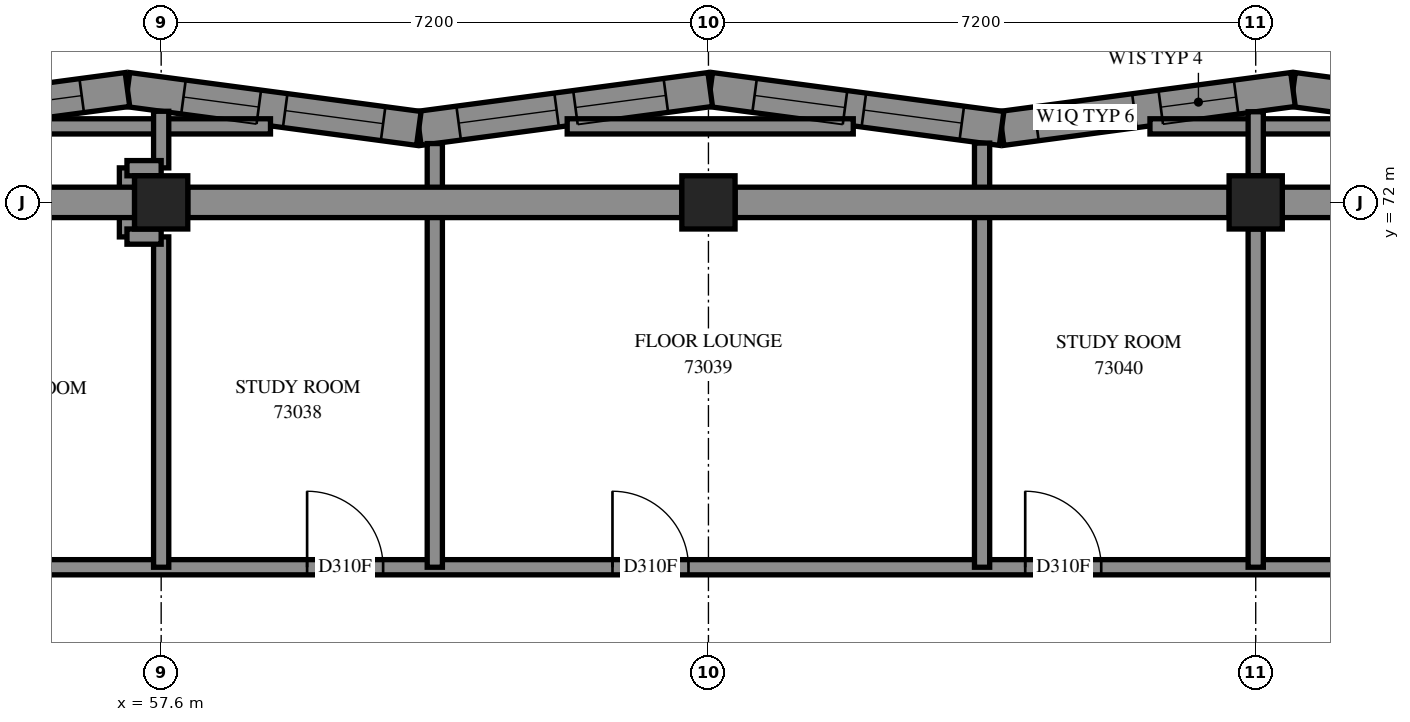
"""IFC4 building model, lengths in metres.
Left out: names, types, materials, properties, quantities, classifications, styles, units other than length and angle.
Written with IfcOpenShell. Run it as: python <this file> out.ifc"""

import sys

from ifc_helpers import new_model, si_unit, direction, frame, frame_2d, origin, origin_2d, place, context, subcontext, project, spatial, polyline, rectangle, outline, extrude, element, fill, save


model = new_model("IFC4")
c1 = context("Model", 3, precision=1e-05, world=origin(), true_north=direction((0.0, 1.0)))
c2 = subcontext(c1, "Body", "Model", "MODEL_VIEW")
j1 = project(units=[si_unit("LENGTHUNIT", "METRE"), si_unit("PLANEANGLEUNIT", "RADIAN")], contexts=[c1])
p1 = place(None, origin())
s1 = spatial("IfcSite", under=j1, at=p1, CompositionType="ELEMENT")
p2 = place(p1, origin())
s2 = spatial("IfcBuilding", under=s1, at=p2, CompositionType="ELEMENT")
p3 = place(p2, frame((0.0, 0.0, 267.6)))
s3 = spatial("IfcBuildingStorey", under=s2, at=p3, CompositionType="ELEMENT", Elevation=267.6)
for number, where, z_axis, x_axis in (
    (1, (57.6, 72.0, 0.0), (0.0, 0.0, 1.0), (1.0, 0.0, 0.0)),
    (2, (64.8, 72.0, 0.0), (0.0, 0.0, 1.0), (1.0, 0.0, 0.0)),
    (3, (72.0, 72.0, 0.0), (0.0, 0.0, 1.0), (1.0, 0.0, 0.0)),
):
    element("IfcColumn", number, at=place(p3, frame(where, z_axis=z_axis, x_axis=x_axis)), inside=s3, PredefinedType="COLUMN", context=c2, shape_type="SweptSolid", body=[
        extrude(rectangle(XDim=0.7, YDim=0.7, at=origin_2d()), origin(), (0.0, 0.0, 1.0), 3.1),
    ])
p4 = place(p3, frame((76.341, 72.971, 0.0), z_axis=(0.0, 0.0, 1.0), x_axis=(-0.991198426, 0.1323845925, 0.0)))
e4 = element("IfcWall", 4, at=p4, inside=s3, PredefinedType="SOLIDWALL", context=c2, shape_type="SweptSolid", body=[
    extrude(outline(polyline([(0.047, -0.225), (3.915, -0.225), (3.855, 0.225), (-0.047, 0.225), (0.047, -0.225)])), origin(), (0.0, 0.0, 1.0), 3.1),
])
p5 = place(p4, frame((2.101, 0.0, 0.45)))
e5 = element("IfcOpeningElement", 5, at=p5, cuts=e4, PredefinedType="OPENING", context=c2, shape_type="SweptSolid", body=[
    extrude(rectangle(XDim=1.2, YDim=2.55, at=frame_2d((0.6, 1.275))), frame((0.0, 0.235, 0.0), z_axis=(0.0, -1.0, 0.0), x_axis=(1.0, 0.0, 0.0)), (0.0, 0.0, 1.0), 0.47),
])
p6 = place(p3, frame((72.491, 73.485, 0.0), z_axis=(0.0, 0.0, 1.0), x_axis=(-0.9911985198, -0.13238389, 0.0)))
e6 = element("IfcWall", 6, at=p6, inside=s3, PredefinedType="SOLIDWALL", context=c2, shape_type="SweptSolid", body=[
    extrude(outline(polyline([(-0.03, -0.225), (3.837, -0.225), (3.898, 0.225), (0.03, 0.225), (-0.03, -0.225)])), origin(), (0.0, 0.0, 1.0), 3.1),
])
p7 = place(p6, frame((0.755, 0.0, 0.45)))
e7 = element("IfcOpeningElement", 7, at=p7, cuts=e6, PredefinedType="OPENING", context=c2, shape_type="SweptSolid", body=[
    extrude(rectangle(XDim=1.0, YDim=2.5, at=frame_2d((0.5, 1.25))), frame((0.0, 0.235, 0.0), z_axis=(0.0, -1.0, 0.0), x_axis=(1.0, 0.0, 0.0)), (0.0, 0.0, 1.0), 0.47),
])
p8 = place(p6, frame((2.105, 0.0, 0.45)))
e8 = element("IfcOpeningElement", 8, at=p8, cuts=e6, PredefinedType="OPENING", context=c2, shape_type="SweptSolid", body=[
    extrude(rectangle(XDim=1.3, YDim=2.5, at=frame_2d((0.65, 1.25))), frame((0.0, 0.235, 0.0), z_axis=(0.0, -1.0, 0.0), x_axis=(1.0, 0.0, 0.0)), (0.0, 0.0, 1.0), 0.47),
])
p9 = place(p3, frame((68.657, 72.973, 0.0), z_axis=(0.0, 0.0, 1.0), x_axis=(-0.9911989729, 0.1323804972, 0.0)))
e9 = element("IfcWall", 9, at=p9, inside=s3, PredefinedType="SOLIDWALL", context=c2, shape_type="SweptSolid", body=[
    extrude(outline(polyline([(0.03, -0.225), (3.898, -0.225), (3.837, 0.225), (-0.03, 0.225), (0.03, -0.225)])), origin(), (0.0, 0.0, 1.0), 3.1),
])
p10 = place(p9, frame((0.528, 0.0, 0.45)))
e10 = element("IfcOpeningElement", 10, at=p10, cuts=e9, PredefinedType="OPENING", context=c2, shape_type="SweptSolid", body=[
    extrude(rectangle(XDim=1.3, YDim=2.5, at=frame_2d((0.65, 1.25))), frame((0.0, 0.235, 0.0), z_axis=(0.0, -1.0, 0.0), x_axis=(1.0, 0.0, 0.0)), (0.0, 0.0, 1.0), 0.47),
])
p11 = place(p9, frame((2.079, 0.0, 0.45)))
e11 = element("IfcOpeningElement", 11, at=p11, cuts=e9, PredefinedType="OPENING", context=c2, shape_type="SweptSolid", body=[
    extrude(rectangle(XDim=1.2, YDim=2.55, at=frame_2d((0.6, 1.275))), frame((0.0, 0.235, 0.0), z_axis=(0.0, -1.0, 0.0), x_axis=(1.0, 0.0, 0.0)), (0.0, 0.0, 1.0), 0.47),
])
p12 = place(p3, frame((64.823, 73.485, 0.0), z_axis=(0.0, 0.0, 1.0), x_axis=(-0.9911985198, -0.13238389, 0.0)))
e12 = element("IfcWall", 12, at=p12, inside=s3, PredefinedType="SOLIDWALL", context=c2, shape_type="SweptSolid", body=[
    extrude(outline(polyline([(-0.03, -0.225), (3.837, -0.225), (3.898, 0.225), (0.03, 0.225), (-0.03, -0.225)])), origin(), (0.0, 0.0, 1.0), 3.1),
])
p13 = place(p12, frame((0.589, 0.0, 0.45)))
e13 = element("IfcOpeningElement", 13, at=p13, cuts=e12, PredefinedType="OPENING", context=c2, shape_type="SweptSolid", body=[
    extrude(rectangle(XDim=1.2, YDim=2.55, at=frame_2d((0.6, 1.275))), frame((0.0, 0.235, 0.0), z_axis=(0.0, -1.0, 0.0), x_axis=(1.0, 0.0, 0.0)), (0.0, 0.0, 1.0), 0.47),
])
p14 = place(p12, frame((2.039, 0.0, 0.45)))
e14 = element("IfcOpeningElement", 14, at=p14, cuts=e12, PredefinedType="OPENING", context=c2, shape_type="SweptSolid", body=[
    extrude(rectangle(XDim=1.3, YDim=2.5, at=frame_2d((0.65, 1.25))), frame((0.0, 0.235, 0.0), z_axis=(0.0, -1.0, 0.0), x_axis=(1.0, 0.0, 0.0)), (0.0, 0.0, 1.0), 0.47),
])
p15 = place(p3, frame((60.99, 72.973, 0.0), z_axis=(0.0, 0.0, 1.0), x_axis=(-0.9911989729, 0.1323804972, 0.0)))
e15 = element("IfcWall", 15, at=p15, inside=s3, PredefinedType="SOLIDWALL", context=c2, shape_type="SweptSolid", body=[
    extrude(outline(polyline([(0.03, -0.225), (3.898, -0.225), (3.837, 0.225), (-0.03, 0.225), (0.03, -0.225)])), origin(), (0.0, 0.0, 1.0), 3.1),
])
p16 = place(p15, frame((0.474, 0.0, 0.45)))
e16 = element("IfcOpeningElement", 16, at=p16, cuts=e15, PredefinedType="OPENING", context=c2, shape_type="SweptSolid", body=[
    extrude(rectangle(XDim=1.3, YDim=2.5, at=frame_2d((0.65, 1.25))), frame((0.0, 0.235, 0.0), z_axis=(0.0, -1.0, 0.0), x_axis=(1.0, 0.0, 0.0)), (0.0, 0.0, 1.0), 0.47),
])
p17 = place(p15, frame((2.124, 0.0, 0.45)))
e17 = element("IfcOpeningElement", 17, at=p17, cuts=e15, PredefinedType="OPENING", context=c2, shape_type="SweptSolid", body=[
    extrude(rectangle(XDim=1.0, YDim=2.5, at=frame_2d((0.5, 1.25))), frame((0.0, 0.235, 0.0), z_axis=(0.0, -1.0, 0.0), x_axis=(1.0, 0.0, 0.0)), (0.0, 0.0, 1.0), 0.47),
])
p18 = place(p3, frame((57.156, 73.485, 0.0), z_axis=(0.0, 0.0, 1.0), x_axis=(-0.9911985198, -0.13238389, 0.0)))
e18 = element("IfcWall", 18, at=p18, inside=s3, PredefinedType="SOLIDWALL", context=c2, shape_type="SweptSolid", body=[
    extrude(outline(polyline([(-0.03, -0.225), (3.837, -0.225), (3.898, 0.225), (0.03, 0.225), (-0.03, -0.225)])), origin(), (0.0, 0.0, 1.0), 3.1),
])
p19 = place(p18, frame((0.607, 0.0, 0.45)))
e19 = element("IfcOpeningElement", 19, at=p19, cuts=e18, PredefinedType="OPENING", context=c2, shape_type="SweptSolid", body=[
    extrude(rectangle(XDim=1.2, YDim=2.55, at=frame_2d((0.6, 1.275))), frame((0.0, 0.235, 0.0), z_axis=(0.0, -1.0, 0.0), x_axis=(1.0, 0.0, 0.0)), (0.0, 0.0, 1.0), 0.47),
])
p20 = place(p3, frame((55.2, 67.2, 0.0), z_axis=(0.0, 0.0, 1.0), x_axis=(1.0, 0.0, 0.0)))
e20 = element("IfcWall", 20, at=p20, inside=s3, PredefinedType="PARTITIONING", context=c2, shape_type="SweptSolid", body=[
    extrude(rectangle(XDim=19.2, YDim=0.2, at=frame_2d((9.6, 0.0))), origin(), (0.0, 0.0, 1.0), 3.1),
])
p21 = place(p20, frame((4.32, 0.0, 0.0)))
e21 = element("IfcOpeningElement", 21, at=p21, cuts=e20, PredefinedType="OPENING", context=c2, shape_type="SweptSolid", body=[
    extrude(rectangle(XDim=1.0, YDim=2.1, at=frame_2d((0.5, 1.05))), frame((0.0, 0.11, 0.0), z_axis=(0.0, -1.0, 0.0), x_axis=(1.0, 0.0, 0.0)), (0.0, 0.0, 1.0), 0.22),
])
p22 = place(p20, frame((8.338, 0.0, 0.0)))
e22 = element("IfcOpeningElement", 22, at=p22, cuts=e20, PredefinedType="OPENING", context=c2, shape_type="SweptSolid", body=[
    extrude(rectangle(XDim=1.0, YDim=2.1, at=frame_2d((0.5, 1.05))), frame((0.0, 0.11, 0.0), z_axis=(0.0, -1.0, 0.0), x_axis=(1.0, 0.0, 0.0)), (0.0, 0.0, 1.0), 0.22),
])
p23 = place(p20, frame((13.768, 0.0, 0.0)))
e23 = element("IfcOpeningElement", 23, at=p23, cuts=e20, PredefinedType="OPENING", context=c2, shape_type="SweptSolid", body=[
    extrude(rectangle(XDim=1.0, YDim=2.1, at=frame_2d((0.5, 1.05))), frame((0.0, 0.11, 0.0), z_axis=(0.0, -1.0, 0.0), x_axis=(1.0, 0.0, 0.0)), (0.0, 0.0, 1.0), 0.22),
])
p24 = place(p3, frame((68.4, 67.2, 0.0), z_axis=(0.0, 0.0, 1.0), x_axis=(0.0, 1.0, 0.0)))
e24 = element("IfcWall", 24, at=p24, inside=s3, PredefinedType="PARTITIONING", context=c2, shape_type="SweptSolid", body=[
    extrude(rectangle(XDim=5.58, YDim=0.2, at=frame_2d((2.79, 0.0))), origin(), (0.0, 0.0, 1.0), 3.1),
])
p25 = place(p3, frame((61.2, 67.2, 0.0), z_axis=(0.0, 0.0, 1.0), x_axis=(0.0, 1.0, 0.0)))
e25 = element("IfcWall", 25, at=p25, inside=s3, PredefinedType="PARTITIONING", context=c2, shape_type="SweptSolid", body=[
    extrude(rectangle(XDim=5.574, YDim=0.2, at=frame_2d((2.787, 0.0))), origin(), (0.0, 0.0, 1.0), 3.1),
])
p26 = place(p3, frame((72.0, 67.2, 0.0), z_axis=(0.0, 0.0, 1.0), x_axis=(0.0, 1.0, 0.0)))
e26 = element("IfcWall", 26, at=p26, inside=s3, PredefinedType="PARTITIONING", context=c2, shape_type="SweptSolid", body=[
    extrude(rectangle(XDim=4.45, YDim=0.2, at=frame_2d((2.225, 0.0))), origin(), (0.0, 0.0, 1.0), 3.1),
])
p27 = place(p3, frame((57.6, 67.2, 0.0), z_axis=(0.0, 0.0, 1.0), x_axis=(0.0, 1.0, 0.0)))
e27 = element("IfcWall", 27, at=p27, inside=s3, PredefinedType="PARTITIONING", context=c2, shape_type="SweptSolid", body=[
    extrude(rectangle(XDim=4.346, YDim=0.2, at=frame_2d((2.173, 0.0))), origin(), (0.0, 0.0, 1.0), 3.1),
])
for number, where, z_axis, x_axis in (
    (28, (70.609, 73.0, 0.0), (0.0, 0.0, 1.0), (1.0, 0.0, 0.0)),
    (29, (55.275, 73.0, 0.0), (0.0, 0.0, 1.0), (1.0, 0.0, 0.0)),
    (30, (62.942, 73.0, 0.0), (0.0, 0.0, 1.0), (1.0, 0.0, 0.0)),
):
    element("IfcWall", number, at=place(p3, frame(where, z_axis=z_axis, x_axis=x_axis)), inside=s3, PredefinedType="PARTITIONING", context=c2, shape_type="SweptSolid", body=[
        extrude(rectangle(XDim=3.764, YDim=0.2, at=frame_2d((1.882, 0.0))), origin(), (0.0, 0.0, 1.0), 3.1),
    ])
p28 = place(p3, frame((57.15, 71.546, 0.0), z_axis=(0.0, 0.0, 1.0), x_axis=(0.0, 1.0, 0.0)))
e31 = element("IfcWall", 31, at=p28, inside=s3, PredefinedType="PARTITIONING", context=c2, shape_type="SweptSolid", body=[
    extrude(rectangle(XDim=0.908, YDim=0.2, at=frame_2d((0.454, 0.0))), origin(), (0.0, 0.0, 1.0), 3.1),
])
p29 = place(p3, frame((72.0, 72.35, 0.0), z_axis=(0.0, 0.0, 1.0), x_axis=(0.0, 1.0, 0.0)))
e32 = element("IfcWall", 32, at=p29, inside=s3, PredefinedType="PARTITIONING", context=c2, shape_type="SweptSolid", body=[
    extrude(rectangle(XDim=0.843, YDim=0.2, at=frame_2d((0.421, 0.0))), origin(), (0.0, 0.0, 1.0), 3.1),
])
p30 = place(p3, frame((57.6, 72.454, 0.0), z_axis=(0.0, 0.0, 1.0), x_axis=(0.0, 1.0, 0.0)))
e33 = element("IfcWall", 33, at=p30, inside=s3, PredefinedType="PARTITIONING", context=c2, shape_type="SweptSolid", body=[
    extrude(rectangle(XDim=0.745, YDim=0.2, at=frame_2d((0.372, 0.0))), origin(), (0.0, 0.0, 1.0), 3.1),
])
for number, where, z_axis, x_axis in (
    (34, (57.15, 72.45, 0.0), (0.0, 0.0, 1.0), (1.0, 0.0, 0.0)),
    (35, (57.15, 71.55, 0.0), (0.0, 0.0, 1.0), (1.0, 0.0, 0.0)),
):
    element("IfcWall", number, at=place(p3, frame(where, z_axis=z_axis, x_axis=x_axis)), inside=s3, PredefinedType="PARTITIONING", context=c2, shape_type="SweptSolid", body=[
        extrude(rectangle(XDim=0.45, YDim=0.2, at=frame_2d((0.225, 0.0))), origin(), (0.0, 0.0, 1.0), 3.1),
    ])
p31 = place(p19, origin())
e36 = element("IfcWindow", 36, at=p31, inside=s3, PartitioningType="SINGLE_PANEL", PredefinedType="WINDOW", context=c2, shape_type="SweptSolid", body=[
    extrude(rectangle(XDim=1.2, YDim=2.55, at=frame_2d((0.6, 1.275))), frame((0.0, 0.115, 0.0), z_axis=(0.0, -1.0, 0.0), x_axis=(1.0, 0.0, 0.0)), (0.0, 0.0, 1.0), 0.06),
])
fill(e19, e36)
p32 = place(p21, origin())
e37 = element("IfcDoor", 37, at=p32, inside=s3, OperationType="SINGLE_SWING_RIGHT", PredefinedType="DOOR", context=c2, shape_type="SweptSolid", body=[
    extrude(rectangle(XDim=1.0, YDim=2.1, at=frame_2d((0.5, 1.05))), frame((0.0, 0.025, 0.0), z_axis=(0.0, -1.0, 0.0), x_axis=(1.0, 0.0, 0.0)), (0.0, 0.0, 1.0), 0.05),
])
fill(e21, e37)
p33 = place(p22, origin())
e38 = element("IfcDoor", 38, at=p33, inside=s3, OperationType="SINGLE_SWING_LEFT", PredefinedType="DOOR", context=c2, shape_type="SweptSolid", body=[
    extrude(rectangle(XDim=1.0, YDim=2.1, at=frame_2d((0.5, 1.05))), frame((0.0, 0.025, 0.0), z_axis=(0.0, -1.0, 0.0), x_axis=(1.0, 0.0, 0.0)), (0.0, 0.0, 1.0), 0.05),
])
fill(e22, e38)
p34 = place(p23, origin())
e39 = element("IfcDoor", 39, at=p34, inside=s3, OperationType="SINGLE_SWING_LEFT", PredefinedType="DOOR", context=c2, shape_type="SweptSolid", body=[
    extrude(rectangle(XDim=1.0, YDim=2.1, at=frame_2d((0.5, 1.05))), frame((0.0, 0.025, 0.0), z_axis=(0.0, -1.0, 0.0), x_axis=(1.0, 0.0, 0.0)), (0.0, 0.0, 1.0), 0.05),
])
fill(e23, e39)
p35 = place(p7, origin())
e40 = element("IfcWindow", 40, at=p35, inside=s3, PartitioningType="SINGLE_PANEL", PredefinedType="WINDOW", context=c2, shape_type="SweptSolid", body=[
    extrude(rectangle(XDim=1.0, YDim=2.5, at=frame_2d((0.5, 1.25))), frame((0.0, 0.115, 0.0), z_axis=(0.0, -1.0, 0.0), x_axis=(1.0, 0.0, 0.0)), (0.0, 0.0, 1.0), 0.06),
])
fill(e7, e40)
p36 = place(p8, origin())
e41 = element("IfcWindow", 41, at=p36, inside=s3, PartitioningType="SINGLE_PANEL", PredefinedType="WINDOW", context=c2, shape_type="SweptSolid", body=[
    extrude(rectangle(XDim=1.3, YDim=2.5, at=frame_2d((0.65, 1.25))), frame((0.0, 0.205, 0.0), z_axis=(0.0, -1.0, 0.0), x_axis=(1.0, 0.0, 0.0)), (0.0, 0.0, 1.0), 0.06),
])
fill(e8, e41)
p37 = place(p10, origin())
e42 = element("IfcWindow", 42, at=p37, inside=s3, PartitioningType="SINGLE_PANEL", PredefinedType="WINDOW", context=c2, shape_type="SweptSolid", body=[
    extrude(rectangle(XDim=1.3, YDim=2.5, at=frame_2d((0.65, 1.25))), frame((0.0, 0.205, 0.0), z_axis=(0.0, -1.0, 0.0), x_axis=(1.0, 0.0, 0.0)), (0.0, 0.0, 1.0), 0.06),
])
fill(e10, e42)
p38 = place(p11, origin())
e43 = element("IfcWindow", 43, at=p38, inside=s3, PartitioningType="SINGLE_PANEL", PredefinedType="WINDOW", context=c2, shape_type="SweptSolid", body=[
    extrude(rectangle(XDim=1.2, YDim=2.55, at=frame_2d((0.6, 1.275))), frame((0.0, 0.115, 0.0), z_axis=(0.0, -1.0, 0.0), x_axis=(1.0, 0.0, 0.0)), (0.0, 0.0, 1.0), 0.06),
])
fill(e11, e43)
p39 = place(p13, origin())
e44 = element("IfcWindow", 44, at=p39, inside=s3, PartitioningType="SINGLE_PANEL", PredefinedType="WINDOW", context=c2, shape_type="SweptSolid", body=[
    extrude(rectangle(XDim=1.2, YDim=2.55, at=frame_2d((0.6, 1.275))), frame((0.0, 0.115, 0.0), z_axis=(0.0, -1.0, 0.0), x_axis=(1.0, 0.0, 0.0)), (0.0, 0.0, 1.0), 0.06),
])
fill(e13, e44)
p40 = place(p14, origin())
e45 = element("IfcWindow", 45, at=p40, inside=s3, PartitioningType="SINGLE_PANEL", PredefinedType="WINDOW", context=c2, shape_type="SweptSolid", body=[
    extrude(rectangle(XDim=1.3, YDim=2.5, at=frame_2d((0.65, 1.25))), frame((0.0, 0.205, 0.0), z_axis=(0.0, -1.0, 0.0), x_axis=(1.0, 0.0, 0.0)), (0.0, 0.0, 1.0), 0.06),
])
fill(e14, e45)
p41 = place(p16, origin())
e46 = element("IfcWindow", 46, at=p41, inside=s3, PartitioningType="SINGLE_PANEL", PredefinedType="WINDOW", context=c2, shape_type="SweptSolid", body=[
    extrude(rectangle(XDim=1.3, YDim=2.5, at=frame_2d((0.65, 1.25))), frame((0.0, 0.205, 0.0), z_axis=(0.0, -1.0, 0.0), x_axis=(1.0, 0.0, 0.0)), (0.0, 0.0, 1.0), 0.06),
])
fill(e16, e46)
p42 = place(p17, origin())
e47 = element("IfcWindow", 47, at=p42, inside=s3, PartitioningType="SINGLE_PANEL", PredefinedType="WINDOW", context=c2, shape_type="SweptSolid", body=[
    extrude(rectangle(XDim=1.0, YDim=2.5, at=frame_2d((0.5, 1.25))), frame((0.0, 0.125, 0.0), z_axis=(0.0, -1.0, 0.0), x_axis=(1.0, 0.0, 0.0)), (0.0, 0.0, 1.0), 0.06),
])
fill(e17, e47)
save(model, sys.argv[1])
